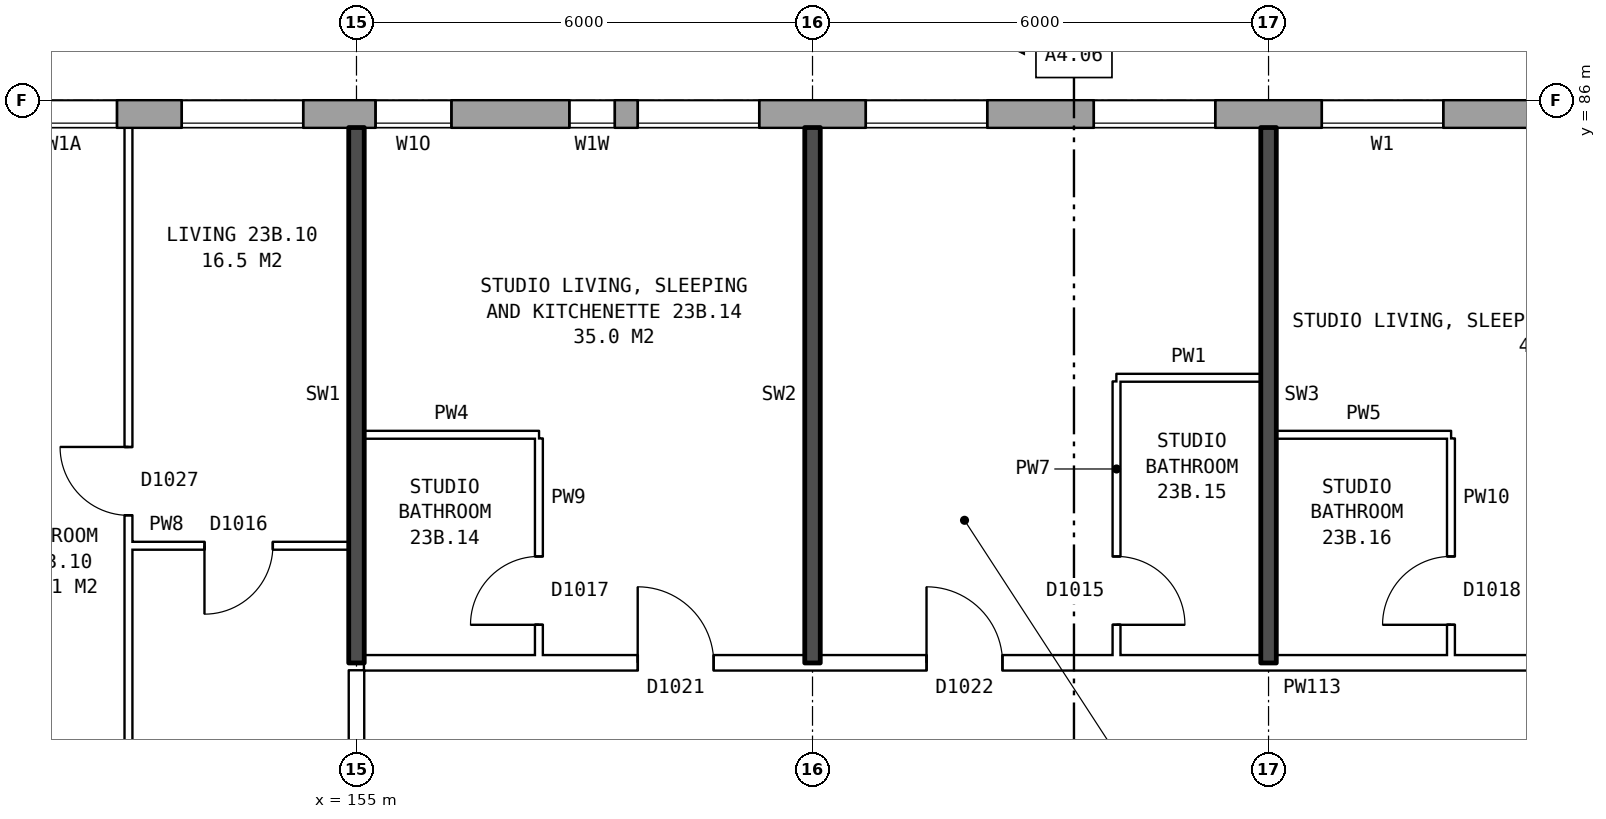
"""IFC4 building model, lengths in metres.
Left out: names, types, materials, properties, quantities, classifications, styles, units other than length and angle.
Written with IfcOpenShell. Run it as: python <this file> out.ifc"""

import sys

from ifc_helpers import new_model, si_unit, direction, frame, frame_2d, origin, place, context, subcontext, project, spatial, rectangle, extrude, element, fill, save


model = new_model("IFC4")
c1 = context("Model", 3, precision=1e-05, world=origin(), true_north=direction((0.0, 1.0)))
c2 = subcontext(c1, "Body", "Model", "MODEL_VIEW")
j1 = project(units=[si_unit("LENGTHUNIT", "METRE"), si_unit("PLANEANGLEUNIT", "RADIAN")], contexts=[c1])
p1 = place(None, origin())
s1 = spatial("IfcSite", under=j1, at=p1, CompositionType="ELEMENT")
p2 = place(p1, origin())
s2 = spatial("IfcBuilding", under=s1, at=p2, CompositionType="ELEMENT")
p3 = place(p2, frame((0.0, 0.0, 84.0)))
s3 = spatial("IfcBuildingStorey", under=s2, at=p3, CompositionType="ELEMENT", Elevation=84.0)
p4 = place(p3, frame((172.175, 85.82, 0.0), z_axis=(0.0, 0.0, 1.0), x_axis=(-1.0, 0.0, 0.0)))
e1 = element("IfcWall", 1, at=p4, inside=s3, PredefinedType="STANDARD", context=c2, shape_type="SweptSolid", body=[
    extrude(rectangle(XDim=38.101, YDim=0.36, at=frame_2d((19.05, 0.0))), origin(), (0.0, 0.0, 1.0), 2.85),
])
p5 = place(p4, frame((2.875, 0.0, 0.8)))
e2 = element("IfcOpeningElement", 2, at=p5, cuts=e1, PredefinedType="OPENING", context=c2, shape_type="SweptSolid", body=[
    extrude(rectangle(XDim=1.6, YDim=1.8, at=frame_2d((0.8, 0.9))), frame((0.0, 0.19, 0.0), z_axis=(0.0, -1.0, 0.0), x_axis=(1.0, 0.0, 0.0)), (0.0, 0.0, 1.0), 0.38),
])
p6 = place(p4, frame((5.875, 0.0, 0.8)))
e3 = element("IfcOpeningElement", 3, at=p6, cuts=e1, PredefinedType="OPENING", context=c2, shape_type="SweptSolid", body=[
    extrude(rectangle(XDim=1.6, YDim=1.8, at=frame_2d((0.8, 0.9))), frame((0.0, 0.19, 0.0), z_axis=(0.0, -1.0, 0.0), x_axis=(1.0, 0.0, 0.0)), (0.0, 0.0, 1.0), 0.38),
])
p7 = place(p4, frame((8.875, 0.0, 0.8)))
e4 = element("IfcOpeningElement", 4, at=p7, cuts=e1, PredefinedType="OPENING", context=c2, shape_type="SweptSolid", body=[
    extrude(rectangle(XDim=1.6, YDim=1.8, at=frame_2d((0.8, 0.9))), frame((0.0, 0.19, 0.0), z_axis=(0.0, -1.0, 0.0), x_axis=(1.0, 0.0, 0.0)), (0.0, 0.0, 1.0), 0.38),
])
p8 = place(p4, frame((11.875, 0.0, 0.8)))
e5 = element("IfcOpeningElement", 5, at=p8, cuts=e1, PredefinedType="OPENING", context=c2, shape_type="SweptSolid", body=[
    extrude(rectangle(XDim=1.6, YDim=1.8, at=frame_2d((0.8, 0.9))), frame((0.0, 0.19, 0.0), z_axis=(0.0, -1.0, 0.0), x_axis=(1.0, 0.0, 0.0)), (0.0, 0.0, 1.0), 0.38),
])
p9 = place(p4, frame((13.775, 0.0, 1.6)))
e6 = element("IfcOpeningElement", 6, at=p9, cuts=e1, PredefinedType="OPENING", context=c2, shape_type="SweptSolid", body=[
    extrude(rectangle(XDim=0.6, YDim=0.9, at=frame_2d((0.3, 0.45))), frame((0.0, 0.19, 0.0), z_axis=(0.0, -1.0, 0.0), x_axis=(1.0, 0.0, 0.0)), (0.0, 0.0, 1.0), 0.38),
])
p10 = place(p4, frame((17.875, 0.0, 0.8)))
e7 = element("IfcOpeningElement", 7, at=p10, cuts=e1, PredefinedType="OPENING", context=c2, shape_type="SweptSolid", body=[
    extrude(rectangle(XDim=1.6, YDim=1.8, at=frame_2d((0.8, 0.9))), frame((0.0, 0.19, 0.0), z_axis=(0.0, -1.0, 0.0), x_axis=(1.0, 0.0, 0.0)), (0.0, 0.0, 1.0), 0.38),
])
p11 = place(p4, frame((20.325, 0.0, 0.65)))
e8 = element("IfcOpeningElement", 8, at=p11, cuts=e1, PredefinedType="OPENING", context=c2, shape_type="SweptSolid", body=[
    extrude(rectangle(XDim=1.4, YDim=1.8, at=frame_2d((0.7, 0.9))), frame((0.0, 0.19, 0.0), z_axis=(0.0, -1.0, 0.0), x_axis=(1.0, 0.0, 0.0)), (0.0, 0.0, 1.0), 0.38),
])
p12 = place(p4, frame((23.625, 0.0, 1.7)))
e9 = element("IfcOpeningElement", 9, at=p12, cuts=e1, PredefinedType="OPENING", context=c2, shape_type="SweptSolid", body=[
    extrude(rectangle(XDim=0.6, YDim=0.9, at=frame_2d((0.3, 0.45))), frame((0.0, 0.19, 0.0), z_axis=(0.0, -1.0, 0.0), x_axis=(1.0, 0.0, 0.0)), (0.0, 0.0, 1.0), 0.38),
])
p13 = place(p4, frame((26.875, 0.0, 0.8)))
e10 = element("IfcOpeningElement", 10, at=p13, cuts=e1, PredefinedType="OPENING", context=c2, shape_type="SweptSolid", body=[
    extrude(rectangle(XDim=1.6, YDim=1.8, at=frame_2d((0.8, 0.9))), frame((0.0, 0.19, 0.0), z_axis=(0.0, -1.0, 0.0), x_axis=(1.0, 0.0, 0.0)), (0.0, 0.0, 1.0), 0.38),
])
p14 = place(p4, frame((29.875, 0.0, 0.8)))
e11 = element("IfcOpeningElement", 11, at=p14, cuts=e1, PredefinedType="OPENING", context=c2, shape_type="SweptSolid", body=[
    extrude(rectangle(XDim=1.6, YDim=1.8, at=frame_2d((0.8, 0.9))), frame((0.0, 0.19, 0.0), z_axis=(0.0, -1.0, 0.0), x_axis=(1.0, 0.0, 0.0)), (0.0, 0.0, 1.0), 0.38),
])
p15 = place(p4, frame((32.875, 0.0, 0.8)))
e12 = element("IfcOpeningElement", 12, at=p15, cuts=e1, PredefinedType="OPENING", context=c2, shape_type="SweptSolid", body=[
    extrude(rectangle(XDim=1.6, YDim=1.8, at=frame_2d((0.8, 0.9))), frame((0.0, 0.19, 0.0), z_axis=(0.0, -1.0, 0.0), x_axis=(1.0, 0.0, 0.0)), (0.0, 0.0, 1.0), 0.38),
])
p16 = place(p4, frame((35.875, 0.0, 0.8)))
e13 = element("IfcOpeningElement", 13, at=p16, cuts=e1, PredefinedType="OPENING", context=c2, shape_type="SweptSolid", body=[
    extrude(rectangle(XDim=1.6, YDim=1.8, at=frame_2d((0.8, 0.9))), frame((0.0, 0.19, 0.0), z_axis=(0.0, -1.0, 0.0), x_axis=(1.0, 0.0, 0.0)), (0.0, 0.0, 1.0), 0.38),
])
p17 = place(p4, frame((15.925, 0.0, 0.8)))
e14 = element("IfcOpeningElement", 14, at=p17, cuts=e1, PredefinedType="OPENING", context=c2, shape_type="SweptSolid", body=[
    extrude(rectangle(XDim=1.0, YDim=1.2, at=frame_2d((0.5, 0.6))), frame((0.0, 0.19, 0.0), z_axis=(0.0, -1.0, 0.0), x_axis=(1.0, 0.0, 0.0)), (0.0, 0.0, 1.0), 0.38),
])
p18 = place(p4, frame((22.025, 0.0, 0.65)))
e15 = element("IfcOpeningElement", 15, at=p18, cuts=e1, PredefinedType="OPENING", context=c2, shape_type="SweptSolid", body=[
    extrude(rectangle(XDim=0.6, YDim=0.9, at=frame_2d((0.3, 0.45))), frame((0.0, 0.19, 0.0), z_axis=(0.0, -1.0, 0.0), x_axis=(1.0, 0.0, 0.0)), (0.0, 0.0, 1.0), 0.38),
])
p19 = place(p4, frame((24.525, 0.0, 0.8)))
e16 = element("IfcOpeningElement", 16, at=p19, cuts=e1, PredefinedType="OPENING", context=c2, shape_type="SweptSolid", body=[
    extrude(rectangle(XDim=1.4, YDim=1.8, at=frame_2d((0.7, 0.9))), frame((0.0, 0.19, 0.0), z_axis=(0.0, -1.0, 0.0), x_axis=(1.0, 0.0, 0.0)), (0.0, 0.0, 1.0), 0.38),
])
p20 = place(p3, frame((155.1, 78.6, 0.0), z_axis=(0.0, 0.0, 1.0), x_axis=(1.0, 0.0, 0.0)))
e17 = element("IfcWall", 17, at=p20, inside=s3, PredefinedType="PARTITIONING", context=c2, shape_type="SweptSolid", body=[
    extrude(rectangle(XDim=19.79, YDim=0.2, at=frame_2d((9.895, 0.0))), origin(), (0.0, 0.0, 1.0), 2.85),
])
p21 = place(p20, frame((3.6, 0.0, 0.0)))
e18 = element("IfcOpeningElement", 18, at=p21, cuts=e17, PredefinedType="OPENING", context=c2, shape_type="SweptSolid", body=[
    extrude(rectangle(XDim=1.0, YDim=2.1, at=frame_2d((0.5, 1.05))), frame((0.0, 0.11, 0.0), z_axis=(0.0, -1.0, 0.0), x_axis=(1.0, 0.0, 0.0)), (0.0, 0.0, 1.0), 0.22),
])
p22 = place(p20, frame((7.4, 0.0, 0.0)))
e19 = element("IfcOpeningElement", 19, at=p22, cuts=e17, PredefinedType="OPENING", context=c2, shape_type="SweptSolid", body=[
    extrude(rectangle(XDim=1.0, YDim=2.1, at=frame_2d((0.5, 1.05))), frame((0.0, 0.11, 0.0), z_axis=(0.0, -1.0, 0.0), x_axis=(1.0, 0.0, 0.0)), (0.0, 0.0, 1.0), 0.22),
])
p23 = place(p20, frame((16.545, 0.0, 0.0)))
e20 = element("IfcOpeningElement", 20, at=p23, cuts=e17, PredefinedType="OPENING", context=c2, shape_type="SweptSolid", body=[
    extrude(rectangle(XDim=1.0, YDim=2.1, at=frame_2d((0.5, 1.05))), frame((0.0, 0.11, 0.0), z_axis=(0.0, -1.0, 0.0), x_axis=(1.0, 0.0, 0.0)), (0.0, 0.0, 1.0), 0.22),
])
p24 = place(p3, frame((152.0, 80.14, 0.0), z_axis=(0.0, 0.0, 1.0), x_axis=(1.0, 0.0, 0.0)))
e21 = element("IfcWall", 21, at=p24, inside=s3, PredefinedType="PARTITIONING", context=c2, shape_type="SweptSolid", body=[
    extrude(rectangle(XDim=2.9, YDim=0.1, at=frame_2d((1.45, 0.0))), origin(), (0.0, 0.0, 1.0), 2.85),
])
p25 = place(p24, frame((1.0, 0.0, 0.0)))
e22 = element("IfcOpeningElement", 22, at=p25, cuts=e21, PredefinedType="OPENING", context=c2, shape_type="SweptSolid", body=[
    extrude(rectangle(XDim=0.9, YDim=2.1, at=frame_2d((0.45, 1.05))), frame((0.0, 0.06, 0.0), z_axis=(0.0, -1.0, 0.0), x_axis=(1.0, 0.0, 0.0)), (0.0, 0.0, 1.0), 0.12),
])
for number, where, z_axis, x_axis in (
    (23, (155.1, 81.6, 0.0), (0.0, 0.0, 1.0), (1.0, 0.0, 0.0)),
    (24, (167.1, 81.6, 0.0), (0.0, 0.0, 1.0), (1.0, 0.0, 0.0)),
):
    element("IfcWall", number, at=place(p3, frame(where, z_axis=z_axis, x_axis=x_axis)), inside=s3, PredefinedType="PARTITIONING", context=c2, shape_type="SweptSolid", body=[
        extrude(rectangle(XDim=2.3, YDim=0.1, at=frame_2d((1.15, 0.0))), origin(), (0.0, 0.0, 1.0), 2.85),
    ])
p26 = place(p3, frame((165.0, 82.35, 0.0), z_axis=(0.0, 0.0, 1.0), x_axis=(1.0, 0.0, 0.0)))
e25 = element("IfcWall", 25, at=p26, inside=s3, PredefinedType="PARTITIONING", context=c2, shape_type="SweptSolid", body=[
    extrude(rectangle(XDim=1.9, YDim=0.1, at=frame_2d((0.95, 0.0))), origin(), (0.0, 0.0, 1.0), 2.85),
])
p27 = place(p3, frame((152.0, 71.3, 0.0), z_axis=(0.0, 0.0, 1.0), x_axis=(0.0, 1.0, 0.0)))
e26 = element("IfcWall", 26, at=p27, inside=s3, PredefinedType="PARTITIONING", context=c2, shape_type="SweptSolid", body=[
    extrude(rectangle(XDim=14.34, YDim=0.1, at=frame_2d((7.17, 0.0))), origin(), (0.0, 0.0, 1.0), 2.85),
])
p28 = place(p27, frame((9.24, 0.0, 0.0)))
e27 = element("IfcOpeningElement", 27, at=p28, cuts=e26, PredefinedType="OPENING", context=c2, shape_type="SweptSolid", body=[
    extrude(rectangle(XDim=0.9, YDim=2.1, at=frame_2d((0.45, 1.05))), frame((0.0, 0.06, 0.0), z_axis=(0.0, -1.0, 0.0), x_axis=(1.0, 0.0, 0.0)), (0.0, 0.0, 1.0), 0.12),
])
p29 = place(p27, frame((0.4, 0.0, 0.0)))
e28 = element("IfcOpeningElement", 28, at=p29, cuts=e26, PredefinedType="OPENING", context=c2, shape_type="SweptSolid", body=[
    extrude(rectangle(XDim=0.9, YDim=2.1, at=frame_2d((0.45, 1.05))), frame((0.0, 0.06, 0.0), z_axis=(0.0, -1.0, 0.0), x_axis=(1.0, 0.0, 0.0)), (0.0, 0.0, 1.0), 0.12),
])
p30 = place(p3, frame((155.0, 76.3, 0.0), z_axis=(0.0, 0.0, 1.0), x_axis=(0.0, 1.0, 0.0)))
e29 = element("IfcWall", 29, at=p30, inside=s3, PredefinedType="PARTITIONING", context=c2, shape_type="SweptSolid", body=[
    extrude(rectangle(XDim=2.2, YDim=0.2, at=frame_2d((1.1, 0.0))), origin(), (0.0, 0.0, 1.0), 2.85),
])
p31 = place(p3, frame((155.0, 78.6, 0.0), z_axis=(0.0, 0.0, 1.0), x_axis=(0.0, 1.0, 0.0)))
e30 = element("IfcWall", 30, at=p31, inside=s3, PredefinedType="SOLIDWALL", context=c2, shape_type="SweptSolid", body=[
    extrude(rectangle(XDim=7.04, YDim=0.2, at=frame_2d((3.52, 0.0))), origin(), (0.0, 0.0, 1.0), 2.85),
])
p32 = place(p3, frame((157.4, 78.7, 0.0), z_axis=(0.0, 0.0, 1.0), x_axis=(0.0, 1.0, 0.0)))
e31 = element("IfcWall", 31, at=p32, inside=s3, PredefinedType="PARTITIONING", context=c2, shape_type="SweptSolid", body=[
    extrude(rectangle(XDim=2.85, YDim=0.1, at=frame_2d((1.425, 0.0))), origin(), (0.0, 0.0, 1.0), 2.85),
])
p33 = place(p32, frame((0.4, 0.0, 0.0)))
e32 = element("IfcOpeningElement", 32, at=p33, cuts=e31, PredefinedType="OPENING", context=c2, shape_type="SweptSolid", body=[
    extrude(rectangle(XDim=0.9, YDim=2.1, at=frame_2d((0.45, 1.05))), frame((0.0, 0.06, 0.0), z_axis=(0.0, -1.0, 0.0), x_axis=(1.0, 0.0, 0.0)), (0.0, 0.0, 1.0), 0.12),
])
p34 = place(p3, frame((161.0, 78.6, 0.0), z_axis=(0.0, 0.0, 1.0), x_axis=(0.0, 1.0, 0.0)))
e33 = element("IfcWall", 33, at=p34, inside=s3, PredefinedType="SOLIDWALL", context=c2, shape_type="SweptSolid", body=[
    extrude(rectangle(XDim=7.04, YDim=0.2, at=frame_2d((3.52, 0.0))), origin(), (0.0, 0.0, 1.0), 2.85),
])
p35 = place(p3, frame((165.0, 78.7, 0.0), z_axis=(0.0, 0.0, 1.0), x_axis=(0.0, 1.0, 0.0)))
e34 = element("IfcWall", 34, at=p35, inside=s3, PredefinedType="PARTITIONING", context=c2, shape_type="SweptSolid", body=[
    extrude(rectangle(XDim=3.6, YDim=0.1, at=frame_2d((1.8, 0.0))), origin(), (0.0, 0.0, 1.0), 2.85),
])
p36 = place(p35, frame((0.4, 0.0, 0.0)))
e35 = element("IfcOpeningElement", 35, at=p36, cuts=e34, PredefinedType="OPENING", context=c2, shape_type="SweptSolid", body=[
    extrude(rectangle(XDim=0.9, YDim=2.1, at=frame_2d((0.45, 1.05))), frame((0.0, 0.06, 0.0), z_axis=(0.0, -1.0, 0.0), x_axis=(1.0, 0.0, 0.0)), (0.0, 0.0, 1.0), 0.12),
])
p37 = place(p3, frame((167.0, 78.6, 0.0), z_axis=(0.0, 0.0, 1.0), x_axis=(0.0, 1.0, 0.0)))
e36 = element("IfcWall", 36, at=p37, inside=s3, PredefinedType="SOLIDWALL", context=c2, shape_type="SweptSolid", body=[
    extrude(rectangle(XDim=7.04, YDim=0.2, at=frame_2d((3.52, 0.0))), origin(), (0.0, 0.0, 1.0), 2.85),
])
p38 = place(p3, frame((169.4, 78.7, 0.0), z_axis=(0.0, 0.0, 1.0), x_axis=(0.0, 1.0, 0.0)))
e37 = element("IfcWall", 37, at=p38, inside=s3, PredefinedType="PARTITIONING", context=c2, shape_type="SweptSolid", body=[
    extrude(rectangle(XDim=2.85, YDim=0.1, at=frame_2d((1.425, 0.0))), origin(), (0.0, 0.0, 1.0), 2.85),
])
p39 = place(p38, frame((0.4, 0.0, 0.0)))
e38 = element("IfcOpeningElement", 38, at=p39, cuts=e37, PredefinedType="OPENING", context=c2, shape_type="SweptSolid", body=[
    extrude(rectangle(XDim=0.9, YDim=2.1, at=frame_2d((0.45, 1.05))), frame((0.0, 0.06, 0.0), z_axis=(0.0, -1.0, 0.0), x_axis=(1.0, 0.0, 0.0)), (0.0, 0.0, 1.0), 0.12),
])
p40 = place(p5, origin())
e39 = element("IfcWindow", 39, at=p40, inside=s3, PartitioningType="SINGLE_PANEL", PredefinedType="WINDOW", context=c2, shape_type="SweptSolid", body=[
    extrude(rectangle(XDim=1.6, YDim=1.8, at=frame_2d((0.8, 0.9))), frame((0.0, 0.15, 0.0), z_axis=(0.0, -1.0, 0.0), x_axis=(1.0, 0.0, 0.0)), (0.0, 0.0, 1.0), 0.06),
])
fill(e2, e39)
p41 = place(p6, origin())
e40 = element("IfcWindow", 40, at=p41, inside=s3, PartitioningType="SINGLE_PANEL", PredefinedType="WINDOW", context=c2, shape_type="SweptSolid", body=[
    extrude(rectangle(XDim=1.6, YDim=1.8, at=frame_2d((0.8, 0.9))), frame((0.0, 0.15, 0.0), z_axis=(0.0, -1.0, 0.0), x_axis=(1.0, 0.0, 0.0)), (0.0, 0.0, 1.0), 0.06),
])
fill(e3, e40)
p42 = place(p7, origin())
e41 = element("IfcWindow", 41, at=p42, inside=s3, PartitioningType="SINGLE_PANEL", PredefinedType="WINDOW", context=c2, shape_type="SweptSolid", body=[
    extrude(rectangle(XDim=1.6, YDim=1.8, at=frame_2d((0.8, 0.9))), frame((0.0, 0.15, 0.0), z_axis=(0.0, -1.0, 0.0), x_axis=(1.0, 0.0, 0.0)), (0.0, 0.0, 1.0), 0.06),
])
fill(e4, e41)
p43 = place(p8, origin())
e42 = element("IfcWindow", 42, at=p43, inside=s3, PartitioningType="SINGLE_PANEL", PredefinedType="WINDOW", context=c2, shape_type="SweptSolid", body=[
    extrude(rectangle(XDim=1.6, YDim=1.8, at=frame_2d((0.8, 0.9))), frame((0.0, 0.15, 0.0), z_axis=(0.0, -1.0, 0.0), x_axis=(1.0, 0.0, 0.0)), (0.0, 0.0, 1.0), 0.06),
])
fill(e5, e42)
p44 = place(p9, origin())
e43 = element("IfcWindow", 43, at=p44, inside=s3, PartitioningType="SINGLE_PANEL", PredefinedType="WINDOW", context=c2, shape_type="SweptSolid", body=[
    extrude(rectangle(XDim=0.6, YDim=0.9, at=frame_2d((0.3, 0.45))), frame((0.0, 0.15, 0.0), z_axis=(0.0, -1.0, 0.0), x_axis=(1.0, 0.0, 0.0)), (0.0, 0.0, 1.0), 0.06),
])
fill(e6, e43)
p45 = place(p10, origin())
e44 = element("IfcWindow", 44, at=p45, inside=s3, PartitioningType="SINGLE_PANEL", PredefinedType="WINDOW", context=c2, shape_type="SweptSolid", body=[
    extrude(rectangle(XDim=1.6, YDim=1.8, at=frame_2d((0.8, 0.9))), frame((0.0, 0.15, 0.0), z_axis=(0.0, -1.0, 0.0), x_axis=(1.0, 0.0, 0.0)), (0.0, 0.0, 1.0), 0.06),
])
fill(e7, e44)
p46 = place(p11, origin())
e45 = element("IfcWindow", 45, at=p46, inside=s3, PartitioningType="SINGLE_PANEL", PredefinedType="WINDOW", context=c2, shape_type="SweptSolid", body=[
    extrude(rectangle(XDim=1.4, YDim=1.8, at=frame_2d((0.7, 0.9))), frame((0.0, 0.15, 0.0), z_axis=(0.0, -1.0, 0.0), x_axis=(1.0, 0.0, 0.0)), (0.0, 0.0, 1.0), 0.06),
])
fill(e8, e45)
p47 = place(p28, origin())
e46 = element("IfcDoor", 46, at=p47, inside=s3, OperationType="SINGLE_SWING_RIGHT", PredefinedType="DOOR", context=c2, shape_type="SweptSolid", body=[
    extrude(rectangle(XDim=0.9, YDim=2.1, at=frame_2d((0.45, 1.05))), frame((0.0, 0.025, 0.0), z_axis=(0.0, -1.0, 0.0), x_axis=(1.0, 0.0, 0.0)), (0.0, 0.0, 1.0), 0.05),
])
fill(e27, e46)
p48 = place(p25, frame((0.9, 0.0, 0.0), z_axis=(0.0, 0.0, 1.0), x_axis=(-1.0, 0.0, 0.0)))
e47 = element("IfcDoor", 47, at=p48, inside=s3, OperationType="SINGLE_SWING_RIGHT", PredefinedType="DOOR", context=c2, shape_type="SweptSolid", body=[
    extrude(rectangle(XDim=0.9, YDim=2.1, at=frame_2d((0.45, 1.05))), frame((0.0, 0.025, 0.0), z_axis=(0.0, -1.0, 0.0), x_axis=(1.0, 0.0, 0.0)), (0.0, 0.0, 1.0), 0.05),
])
fill(e22, e47)
p49 = place(p21, origin())
e48 = element("IfcDoor", 48, at=p49, inside=s3, OperationType="SINGLE_SWING_LEFT", PredefinedType="DOOR", context=c2, shape_type="SweptSolid", body=[
    extrude(rectangle(XDim=1.0, YDim=2.1, at=frame_2d((0.5, 1.05))), frame((0.0, 0.025, 0.0), z_axis=(0.0, -1.0, 0.0), x_axis=(1.0, 0.0, 0.0)), (0.0, 0.0, 1.0), 0.05),
])
fill(e18, e48)
p50 = place(p33, origin())
e49 = element("IfcDoor", 49, at=p50, inside=s3, OperationType="SINGLE_SWING_LEFT", PredefinedType="DOOR", context=c2, shape_type="SweptSolid", body=[
    extrude(rectangle(XDim=0.9, YDim=2.1, at=frame_2d((0.45, 1.05))), frame((0.0, 0.025, 0.0), z_axis=(0.0, -1.0, 0.0), x_axis=(1.0, 0.0, 0.0)), (0.0, 0.0, 1.0), 0.05),
])
fill(e32, e49)
p51 = place(p22, origin())
e50 = element("IfcDoor", 50, at=p51, inside=s3, OperationType="SINGLE_SWING_LEFT", PredefinedType="DOOR", context=c2, shape_type="SweptSolid", body=[
    extrude(rectangle(XDim=1.0, YDim=2.1, at=frame_2d((0.5, 1.05))), frame((0.0, 0.025, 0.0), z_axis=(0.0, -1.0, 0.0), x_axis=(1.0, 0.0, 0.0)), (0.0, 0.0, 1.0), 0.05),
])
fill(e19, e50)
p52 = place(p36, frame((0.9, 0.0, 0.0), z_axis=(0.0, 0.0, 1.0), x_axis=(-1.0, 0.0, 0.0)))
e51 = element("IfcDoor", 51, at=p52, inside=s3, OperationType="SINGLE_SWING_RIGHT", PredefinedType="DOOR", context=c2, shape_type="SweptSolid", body=[
    extrude(rectangle(XDim=0.9, YDim=2.1, at=frame_2d((0.45, 1.05))), frame((0.0, 0.025, 0.0), z_axis=(0.0, -1.0, 0.0), x_axis=(1.0, 0.0, 0.0)), (0.0, 0.0, 1.0), 0.05),
])
fill(e35, e51)
p53 = place(p39, origin())
e52 = element("IfcDoor", 52, at=p53, inside=s3, OperationType="SINGLE_SWING_LEFT", PredefinedType="DOOR", context=c2, shape_type="SweptSolid", body=[
    extrude(rectangle(XDim=0.9, YDim=2.1, at=frame_2d((0.45, 1.05))), frame((0.0, 0.025, 0.0), z_axis=(0.0, -1.0, 0.0), x_axis=(1.0, 0.0, 0.0)), (0.0, 0.0, 1.0), 0.05),
])
fill(e38, e52)
p54 = place(p17, origin())
e53 = element("IfcWindow", 53, at=p54, inside=s3, PartitioningType="SINGLE_PANEL", PredefinedType="WINDOW", context=c2, shape_type="SweptSolid", body=[
    extrude(rectangle(XDim=1.0, YDim=1.2, at=frame_2d((0.5, 0.6))), frame((0.0, 0.15, 0.0), z_axis=(0.0, -1.0, 0.0), x_axis=(1.0, 0.0, 0.0)), (0.0, 0.0, 1.0), 0.06),
])
fill(e14, e53)
save(model, sys.argv[1])
